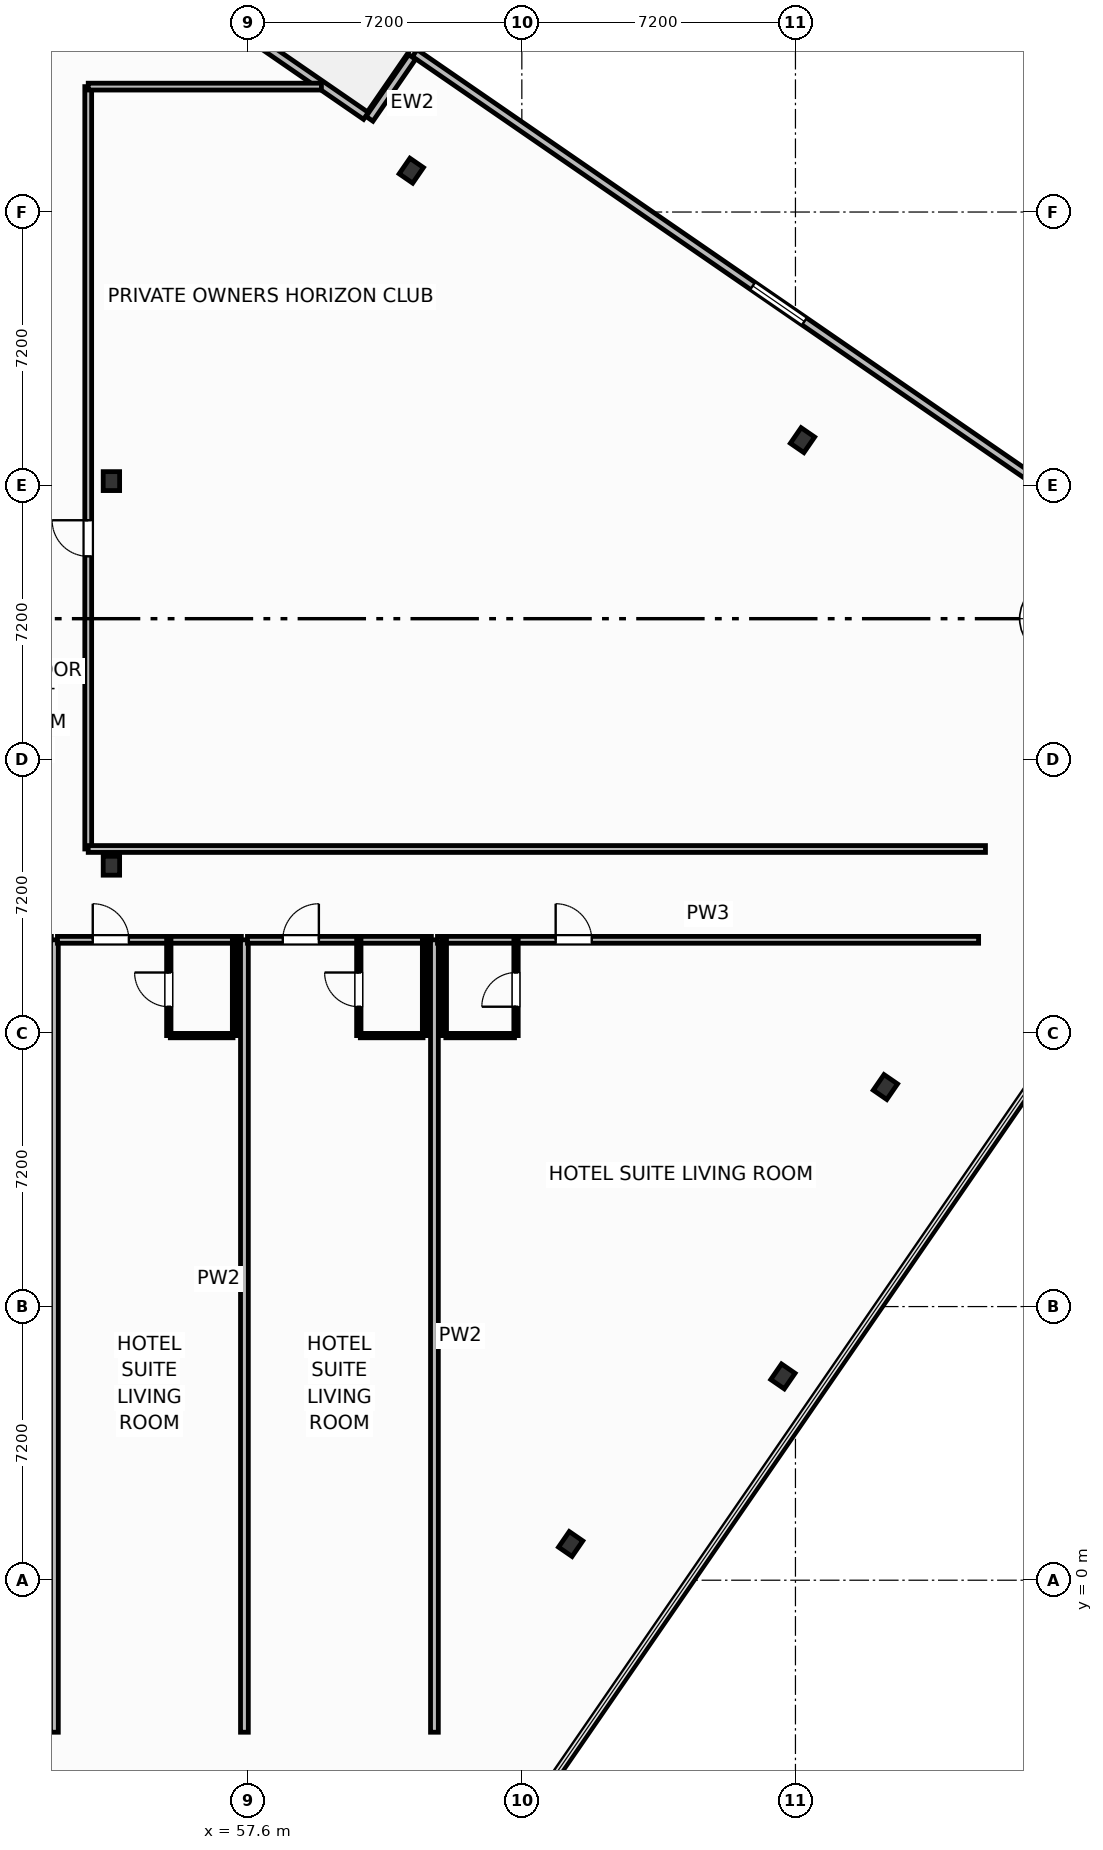
"""IFC4 building model, lengths in metres.
Left out: names, types, materials, properties, quantities, classifications, styles, units other than length and angle.
Written with IfcOpenShell. Run it as: python <this file> out.ifc"""

import sys

from ifc_helpers import new_model, si_unit, direction, frame, frame_2d, origin, origin_2d, place, context, subcontext, project, spatial, rectangle, i_section, extrude, element, fill, save


model = new_model("IFC4")
c1 = context("Model", 3, precision=1e-05, world=origin(), true_north=direction((0.0, 1.0)))
c2 = subcontext(c1, "Body", "Model", "MODEL_VIEW")
j1 = project(units=[si_unit("LENGTHUNIT", "METRE"), si_unit("PLANEANGLEUNIT", "RADIAN")], contexts=[c1])
p1 = place(None, origin())
s1 = spatial("IfcSite", under=j1, at=p1, CompositionType="ELEMENT")
p2 = place(p1, origin())
s2 = spatial("IfcBuilding", under=s1, at=p2, CompositionType="ELEMENT")
p3 = place(p2, frame((0.0, 0.0, 34.4)))
s3 = spatial("IfcBuildingStorey", under=s2, at=p3, CompositionType="ELEMENT", Elevation=34.4)
for number, where, z_axis, x_axis in (
    (1, (54.0, 18.8, 0.0), (0.0, 0.0, 1.0), (1.0, 0.0, 0.0)),
    (2, (54.0, 28.92, 0.0), (0.0, 0.0, 1.0), (1.0, 0.0, 0.0)),
    (3, (66.085, 0.953, 0.0), (0.0, 0.0, 1.0), (0.824, -0.567, 0.0)),
    (4, (71.67, 5.363, 0.0), (0.0, 0.0, 1.0), (0.824, -0.567, 0.0)),
    (5, (74.367, 12.976, 0.0), (0.0, 0.0, 1.0), (0.824, -0.567, 0.0)),
    (6, (72.186, 29.997, 0.0), (0.0, 0.0, 1.0), (0.824, -0.567, 0.0)),
    (7, (61.891, 37.088, 0.0), (0.0, 0.0, 1.0), (0.824, -0.567, 0.0)),
):
    element("IfcColumn", number, at=place(p3, frame(where, z_axis=z_axis, x_axis=x_axis)), inside=s3, PredefinedType="COLUMN", context=c2, shape_type="SweptSolid", body=[
        extrude(i_section(OverallWidth=0.432, OverallDepth=0.498, WebThickness=0.056, FlangeThickness=0.089, FilletRadius=0.025, at=origin_2d()), origin(), (0.0, 0.0, 1.0), 3.7),
    ])
p4 = place(p3, frame((55.757, 41.933, 0.0), z_axis=(0.0, 0.0, 1.0), x_axis=(0.823534636215, -0.567265989598, 0.0)))
e8 = element("IfcWall", 8, at=p4, inside=s3, PredefinedType="SOLIDWALL", context=c2, shape_type="SweptSolid", body=[
    extrude(rectangle(XDim=6.0, YDim=0.22, at=frame_2d((3.0, 0.0))), origin(), (0.0, 0.0, 1.0), 2.73),
])
p5 = place(p4, frame((0.4, 0.0, 0.0)))
e9 = element("IfcOpeningElement", 9, at=p5, cuts=e8, PredefinedType="OPENING", context=c2, shape_type="SweptSolid", body=[
    extrude(rectangle(XDim=1.5, YDim=2.25, at=frame_2d((0.75, 1.125))), frame((0.0, 0.12, 0.0), z_axis=(0.0, -1.0, 0.0), x_axis=(1.0, 0.0, 0.0)), (0.0, 0.0, 1.0), 0.24),
])
p6 = place(p3, frame((33.518, -1.362, 0.0), z_axis=(0.0, 0.0, 1.0), x_axis=(0.82353935489, -0.567259139148, 0.0)))
e10 = element("IfcWall", 10, at=p6, inside=s3, PredefinedType="SOLIDWALL", context=c2, shape_type="SweptSolid", body=[
    extrude(rectangle(XDim=23.147, YDim=0.22, at=frame_2d((11.573, 0.0))), origin(), (0.0, 0.0, 1.0), 2.73),
])
p7 = place(p6, frame((10.749, 0.0, 0.8)))
e11 = element("IfcOpeningElement", 11, at=p7, cuts=e10, PredefinedType="OPENING", context=c2, shape_type="SweptSolid", body=[
    extrude(rectangle(XDim=1.65, YDim=1.65, at=frame_2d((0.825, 0.825))), frame((0.0, 0.12, 0.0), z_axis=(0.0, -1.0, 0.0), x_axis=(1.0, 0.0, 0.0)), (0.0, 0.0, 1.0), 0.24),
])
p8 = place(p3, frame((81.127, 26.995, 0.0), z_axis=(0.0, 0.0, 1.0), x_axis=(-0.823530169317, 0.567272474411, 0.0)))
e12 = element("IfcWall", 12, at=p8, inside=s3, PredefinedType="SOLIDWALL", context=c2, shape_type="SweptSolid", body=[
    extrude(rectangle(XDim=23.247, YDim=0.22, at=frame_2d((11.624, 0.0))), origin(), (0.0, 0.0, 1.0), 2.73),
])
p9 = place(p8, frame((10.799, 0.0, 0.8)))
e13 = element("IfcOpeningElement", 13, at=p9, cuts=e12, PredefinedType="OPENING", context=c2, shape_type="SweptSolid", body=[
    extrude(rectangle(XDim=1.65, YDim=1.65, at=frame_2d((0.825, 0.825))), frame((0.0, 0.12, 0.0), z_axis=(0.0, -1.0, 0.0), x_axis=(1.0, 0.0, 0.0)), (0.0, 0.0, 1.0), 0.24),
])
p10 = place(p3, frame((61.912, 40.079, 0.0), z_axis=(0.0, 0.0, 1.0), x_axis=(-0.567189720735, -0.82358716642, 0.0)))
e14 = element("IfcWall", 14, at=p10, inside=s3, PredefinedType="SOLIDWALL", context=c2, shape_type="SweptSolid", body=[
    extrude(rectangle(XDim=1.975, YDim=0.22, at=frame_2d((0.987, 0.0))), origin(), (0.0, 0.0, 1.0), 2.73),
])
p11 = place(p3, frame((52.5, -4.0, 0.0), z_axis=(0.0, 0.0, 1.0), x_axis=(0.0, 1.0, 0.0)))
e15 = element("IfcWall", 15, at=p11, inside=s3, PredefinedType="PARTITIONING", context=c2, shape_type="SweptSolid", body=[
    extrude(rectangle(XDim=20.85, YDim=0.205, at=frame_2d((10.425, 0.0))), origin(), (0.0, 0.0, 1.0), 3.45),
])
p12 = place(p3, frame((52.58, 16.85, 0.0), z_axis=(0.0, 0.0, 1.0), x_axis=(1.0, 0.0, 0.0)))
e16 = element("IfcWall", 16, at=p12, inside=s3, PredefinedType="PARTITIONING", context=c2, shape_type="SweptSolid", body=[
    extrude(rectangle(XDim=4.84, YDim=0.18, at=frame_2d((2.42, 0.0))), origin(), (0.0, 0.0, 1.0), 3.45),
])
p13 = place(p12, frame((0.929, 0.0, 0.0)))
e17 = element("IfcOpeningElement", 17, at=p13, cuts=e16, PredefinedType="OPENING", context=c2, shape_type="SweptSolid", body=[
    extrude(rectangle(XDim=0.95, YDim=2.15, at=frame_2d((0.475, 1.075))), frame((0.0, 0.1, 0.0), z_axis=(0.0, -1.0, 0.0), x_axis=(1.0, 0.0, 0.0)), (0.0, 0.0, 1.0), 0.2),
])
p14 = place(p3, frame((55.55, 14.33, 0.0), z_axis=(0.0, 0.0, 1.0), x_axis=(1.0, 0.0, 0.0)))
e18 = element("IfcWall", 18, at=p14, inside=s3, PredefinedType="PARTITIONING", context=c2, shape_type="SweptSolid", body=[
    extrude(rectangle(XDim=1.65, YDim=0.115, at=frame_2d((0.825, 0.0))), origin(), (0.0, 0.0, 1.0), 3.45),
])
p15 = place(p3, frame((55.51, 14.33, 0.0), z_axis=(0.0, 0.0, 1.0), x_axis=(0.0, 1.0, 0.0)))
e19 = element("IfcWall", 19, at=p15, inside=s3, PredefinedType="PARTITIONING", context=c2, shape_type="SweptSolid", body=[
    extrude(rectangle(XDim=2.52, YDim=0.115, at=frame_2d((1.26, 0.0))), origin(), (0.0, 0.0, 1.0), 3.45),
])
p16 = place(p15, frame((0.76, 0.0, 0.0)))
e20 = element("IfcOpeningElement", 20, at=p16, cuts=e19, PredefinedType="OPENING", context=c2, shape_type="SweptSolid", body=[
    extrude(rectangle(XDim=0.9, YDim=2.05, at=frame_2d((0.45, 1.025))), frame((0.0, 0.067, 0.0), z_axis=(0.0, -1.0, 0.0), x_axis=(1.0, 0.0, 0.0)), (0.0, 0.0, 1.0), 0.135),
])
p17 = place(p3, frame((57.24, 14.33, 0.0), z_axis=(0.0, 0.0, 1.0), x_axis=(0.0, 1.0, 0.0)))
e21 = element("IfcWall", 21, at=p17, inside=s3, PredefinedType="PARTITIONING", context=c2, shape_type="SweptSolid", body=[
    extrude(rectangle(XDim=2.52, YDim=0.115, at=frame_2d((1.26, 0.0))), origin(), (0.0, 0.0, 1.0), 3.45),
])
p18 = place(p3, frame((57.5, -4.0, 0.0), z_axis=(0.0, 0.0, 1.0), x_axis=(0.0, 1.0, 0.0)))
e22 = element("IfcWall", 22, at=p18, inside=s3, PredefinedType="PARTITIONING", context=c2, shape_type="SweptSolid", body=[
    extrude(rectangle(XDim=20.85, YDim=0.205, at=frame_2d((10.425, 0.0))), origin(), (0.0, 0.0, 1.0), 3.45),
])
p19 = place(p3, frame((57.58, 16.85, 0.0), z_axis=(0.0, 0.0, 1.0), x_axis=(1.0, 0.0, 0.0)))
e23 = element("IfcWall", 23, at=p19, inside=s3, PredefinedType="PARTITIONING", context=c2, shape_type="SweptSolid", body=[
    extrude(rectangle(XDim=4.84, YDim=0.18, at=frame_2d((2.42, 0.0))), origin(), (0.0, 0.0, 1.0), 2.58),
])
p20 = place(p19, frame((0.929, 0.0, 0.0)))
e24 = element("IfcOpeningElement", 24, at=p20, cuts=e23, PredefinedType="OPENING", context=c2, shape_type="SweptSolid", body=[
    extrude(rectangle(XDim=0.95, YDim=2.15, at=frame_2d((0.475, 1.075))), frame((0.0, 0.1, 0.0), z_axis=(0.0, -1.0, 0.0), x_axis=(1.0, 0.0, 0.0)), (0.0, 0.0, 1.0), 0.2),
])
p21 = place(p3, frame((60.55, 14.33, 0.0), z_axis=(0.0, 0.0, 1.0), x_axis=(1.0, 0.0, 0.0)))
e25 = element("IfcWall", 25, at=p21, inside=s3, PredefinedType="PARTITIONING", context=c2, shape_type="SweptSolid", body=[
    extrude(rectangle(XDim=1.65, YDim=0.115, at=frame_2d((0.825, 0.0))), origin(), (0.0, 0.0, 1.0), 3.45),
])
p22 = place(p3, frame((60.51, 14.33, 0.0), z_axis=(0.0, 0.0, 1.0), x_axis=(0.0, 1.0, 0.0)))
e26 = element("IfcWall", 26, at=p22, inside=s3, PredefinedType="PARTITIONING", context=c2, shape_type="SweptSolid", body=[
    extrude(rectangle(XDim=2.52, YDim=0.115, at=frame_2d((1.26, 0.0))), origin(), (0.0, 0.0, 1.0), 3.45),
])
p23 = place(p22, frame((0.76, 0.0, 0.0)))
e27 = element("IfcOpeningElement", 27, at=p23, cuts=e26, PredefinedType="OPENING", context=c2, shape_type="SweptSolid", body=[
    extrude(rectangle(XDim=0.9, YDim=2.05, at=frame_2d((0.45, 1.025))), frame((0.0, 0.067, 0.0), z_axis=(0.0, -1.0, 0.0), x_axis=(1.0, 0.0, 0.0)), (0.0, 0.0, 1.0), 0.135),
])
p24 = place(p3, frame((62.24, 14.33, 0.0), z_axis=(0.0, 0.0, 1.0), x_axis=(0.0, 1.0, 0.0)))
e28 = element("IfcWall", 28, at=p24, inside=s3, PredefinedType="PARTITIONING", context=c2, shape_type="SweptSolid", body=[
    extrude(rectangle(XDim=2.52, YDim=0.115, at=frame_2d((1.26, 0.0))), origin(), (0.0, 0.0, 1.0), 3.45),
])
p25 = place(p3, frame((62.5, -4.0, 0.0), z_axis=(0.0, 0.0, 1.0), x_axis=(0.0, 1.0, 0.0)))
e29 = element("IfcWall", 29, at=p25, inside=s3, PredefinedType="PARTITIONING", context=c2, shape_type="SweptSolid", body=[
    extrude(rectangle(XDim=20.85, YDim=0.205, at=frame_2d((10.425, 0.0))), origin(), (0.0, 0.0, 1.0), 3.45),
])
p26 = place(p3, frame((62.58, 16.85, 0.0), z_axis=(0.0, 0.0, 1.0), x_axis=(1.0, 0.0, 0.0)))
e30 = element("IfcWall", 30, at=p26, inside=s3, PredefinedType="PARTITIONING", context=c2, shape_type="SweptSolid", body=[
    extrude(rectangle(XDim=14.24, YDim=0.18, at=frame_2d((7.12, 0.0))), origin(), (0.0, 0.0, 1.0), 3.45),
])
p27 = place(p26, frame((3.11, 0.0, 0.0)))
e31 = element("IfcOpeningElement", 31, at=p27, cuts=e30, PredefinedType="OPENING", context=c2, shape_type="SweptSolid", body=[
    extrude(rectangle(XDim=0.95, YDim=2.15, at=frame_2d((0.475, 1.075))), frame((0.0, 0.1, 0.0), z_axis=(0.0, -1.0, 0.0), x_axis=(1.0, 0.0, 0.0)), (0.0, 0.0, 1.0), 0.2),
])
p28 = place(p3, frame((62.8, 14.33, 0.0), z_axis=(0.0, 0.0, 1.0), x_axis=(1.0, 0.0, 0.0)))
e32 = element("IfcWall", 32, at=p28, inside=s3, PredefinedType="PARTITIONING", context=c2, shape_type="SweptSolid", body=[
    extrude(rectangle(XDim=1.807, YDim=0.115, at=frame_2d((0.904, 0.0))), origin(), (0.0, 0.0, 1.0), 3.45),
])
p29 = place(p3, frame((64.647, 14.33, 0.0), z_axis=(0.0, 0.0, 1.0), x_axis=(0.0, 1.0, 0.0)))
e33 = element("IfcWall", 33, at=p29, inside=s3, PredefinedType="PARTITIONING", context=c2, shape_type="SweptSolid", body=[
    extrude(rectangle(XDim=2.52, YDim=0.115, at=frame_2d((1.26, 0.0))), origin(), (0.0, 0.0, 1.0), 3.45),
])
p30 = place(p29, frame((0.76, 0.0, 0.0)))
e34 = element("IfcOpeningElement", 34, at=p30, cuts=e33, PredefinedType="OPENING", context=c2, shape_type="SweptSolid", body=[
    extrude(rectangle(XDim=0.9, YDim=2.05, at=frame_2d((0.45, 1.025))), frame((0.0, 0.067, 0.0), z_axis=(0.0, -1.0, 0.0), x_axis=(1.0, 0.0, 0.0)), (0.0, 0.0, 1.0), 0.135),
])
p31 = place(p3, frame((62.76, 14.33, 0.0), z_axis=(0.0, 0.0, 1.0), x_axis=(0.0, 1.0, 0.0)))
e35 = element("IfcWall", 35, at=p31, inside=s3, PredefinedType="PARTITIONING", context=c2, shape_type="SweptSolid", body=[
    extrude(rectangle(XDim=2.52, YDim=0.115, at=frame_2d((1.26, 0.0))), origin(), (0.0, 0.0, 1.0), 3.45),
])
p32 = place(p3, frame((53.39, 19.24, 0.0), z_axis=(0.0, 0.0, 1.0), x_axis=(0.0, 1.0, 0.0)))
e36 = element("IfcWall", 36, at=p32, inside=s3, PredefinedType="PARTITIONING", context=c2, shape_type="SweptSolid", body=[
    extrude(rectangle(XDim=20.06, YDim=0.18, at=frame_2d((10.03, 0.0))), origin(), (0.0, 0.0, 1.0), 3.45),
])
p33 = place(p32, frame((7.7, 0.0, 0.0)))
e37 = element("IfcOpeningElement", 37, at=p33, cuts=e36, PredefinedType="OPENING", context=c2, shape_type="SweptSolid", body=[
    extrude(rectangle(XDim=0.95, YDim=2.05, at=frame_2d((0.475, 1.025))), frame((0.0, 0.1, 0.0), z_axis=(0.0, -1.0, 0.0), x_axis=(1.0, 0.0, 0.0)), (0.0, 0.0, 1.0), 0.2),
])
p34 = place(p3, frame((53.39, 19.24, 0.0), z_axis=(0.0, 0.0, 1.0), x_axis=(1.0, 0.0, 0.0)))
e38 = element("IfcWall", 38, at=p34, inside=s3, PredefinedType="PARTITIONING", context=c2, shape_type="SweptSolid", body=[
    extrude(rectangle(XDim=23.61, YDim=0.18, at=frame_2d((11.805, 0.0))), origin(), (0.0, 0.0, 1.0), 3.45),
])
p35 = place(p3, frame((53.39, 39.3, 0.0), z_axis=(0.0, 0.0, 1.0), x_axis=(1.0, 0.0, 0.0)))
e39 = element("IfcWall", 39, at=p35, inside=s3, PredefinedType="PARTITIONING", context=c2, shape_type="SweptSolid", body=[
    extrude(rectangle(XDim=6.136, YDim=0.18, at=frame_2d((3.068, 0.0))), origin(), (0.0, 0.0, 1.0), 3.45),
])
p36 = place(p9, origin())
e40 = element("IfcWindow", 40, at=p36, inside=s3, PartitioningType="SINGLE_PANEL", PredefinedType="WINDOW", context=c2, shape_type="SweptSolid", body=[
    extrude(rectangle(XDim=1.65, YDim=1.65, at=frame_2d((0.825, 0.825))), frame((0.0, 0.03, 0.0), z_axis=(0.0, -1.0, 0.0), x_axis=(1.0, 0.0, 0.0)), (0.0, 0.0, 1.0), 0.06),
])
fill(e13, e40)
p37 = place(p13, origin())
e41 = element("IfcDoor", 41, at=p37, inside=s3, OperationType="SINGLE_SWING_LEFT", PredefinedType="DOOR", context=c2, shape_type="SweptSolid", body=[
    extrude(rectangle(XDim=0.95, YDim=2.15, at=frame_2d((0.475, 1.075))), frame((0.0, 0.025, 0.0), z_axis=(0.0, -1.0, 0.0), x_axis=(1.0, 0.0, 0.0)), (0.0, 0.0, 1.0), 0.05),
])
fill(e17, e41)
p38 = place(p16, origin())
e42 = element("IfcDoor", 42, at=p38, inside=s3, OperationType="SINGLE_SWING_RIGHT", PredefinedType="DOOR", context=c2, shape_type="SweptSolid", body=[
    extrude(rectangle(XDim=0.9, YDim=2.05, at=frame_2d((0.45, 1.025))), frame((0.0, 0.025, 0.0), z_axis=(0.0, -1.0, 0.0), x_axis=(1.0, 0.0, 0.0)), (0.0, 0.0, 1.0), 0.05),
])
fill(e20, e42)
p39 = place(p20, origin())
e43 = element("IfcDoor", 43, at=p39, inside=s3, OperationType="SINGLE_SWING_RIGHT", PredefinedType="DOOR", context=c2, shape_type="SweptSolid", body=[
    extrude(rectangle(XDim=0.95, YDim=2.15, at=frame_2d((0.475, 1.075))), frame((0.0, 0.025, 0.0), z_axis=(0.0, -1.0, 0.0), x_axis=(1.0, 0.0, 0.0)), (0.0, 0.0, 1.0), 0.05),
])
fill(e24, e43)
p40 = place(p23, origin())
e44 = element("IfcDoor", 44, at=p40, inside=s3, OperationType="SINGLE_SWING_RIGHT", PredefinedType="DOOR", context=c2, shape_type="SweptSolid", body=[
    extrude(rectangle(XDim=0.9, YDim=2.05, at=frame_2d((0.45, 1.025))), frame((0.0, 0.025, 0.0), z_axis=(0.0, -1.0, 0.0), x_axis=(1.0, 0.0, 0.0)), (0.0, 0.0, 1.0), 0.05),
])
fill(e27, e44)
p41 = place(p27, origin())
e45 = element("IfcDoor", 45, at=p41, inside=s3, OperationType="SINGLE_SWING_LEFT", PredefinedType="DOOR", context=c2, shape_type="SweptSolid", body=[
    extrude(rectangle(XDim=0.95, YDim=2.15, at=frame_2d((0.475, 1.075))), frame((0.0, 0.025, 0.0), z_axis=(0.0, -1.0, 0.0), x_axis=(1.0, 0.0, 0.0)), (0.0, 0.0, 1.0), 0.05),
])
fill(e31, e45)
p42 = place(p30, origin())
e46 = element("IfcDoor", 46, at=p42, inside=s3, OperationType="SINGLE_SWING_LEFT", PredefinedType="DOOR", context=c2, shape_type="SweptSolid", body=[
    extrude(rectangle(XDim=0.9, YDim=2.05, at=frame_2d((0.45, 1.025))), frame((0.0, 0.025, 0.0), z_axis=(0.0, -1.0, 0.0), x_axis=(1.0, 0.0, 0.0)), (0.0, 0.0, 1.0), 0.05),
])
fill(e34, e46)
p43 = place(p33, origin())
e47 = element("IfcDoor", 47, at=p43, inside=s3, OperationType="SINGLE_SWING_RIGHT", PredefinedType="DOOR", context=c2, shape_type="SweptSolid", body=[
    extrude(rectangle(XDim=0.95, YDim=2.05, at=frame_2d((0.475, 1.025))), frame((0.0, 0.025, 0.0), z_axis=(0.0, -1.0, 0.0), x_axis=(1.0, 0.0, 0.0)), (0.0, 0.0, 1.0), 0.05),
])
fill(e37, e47)
save(model, sys.argv[1])
